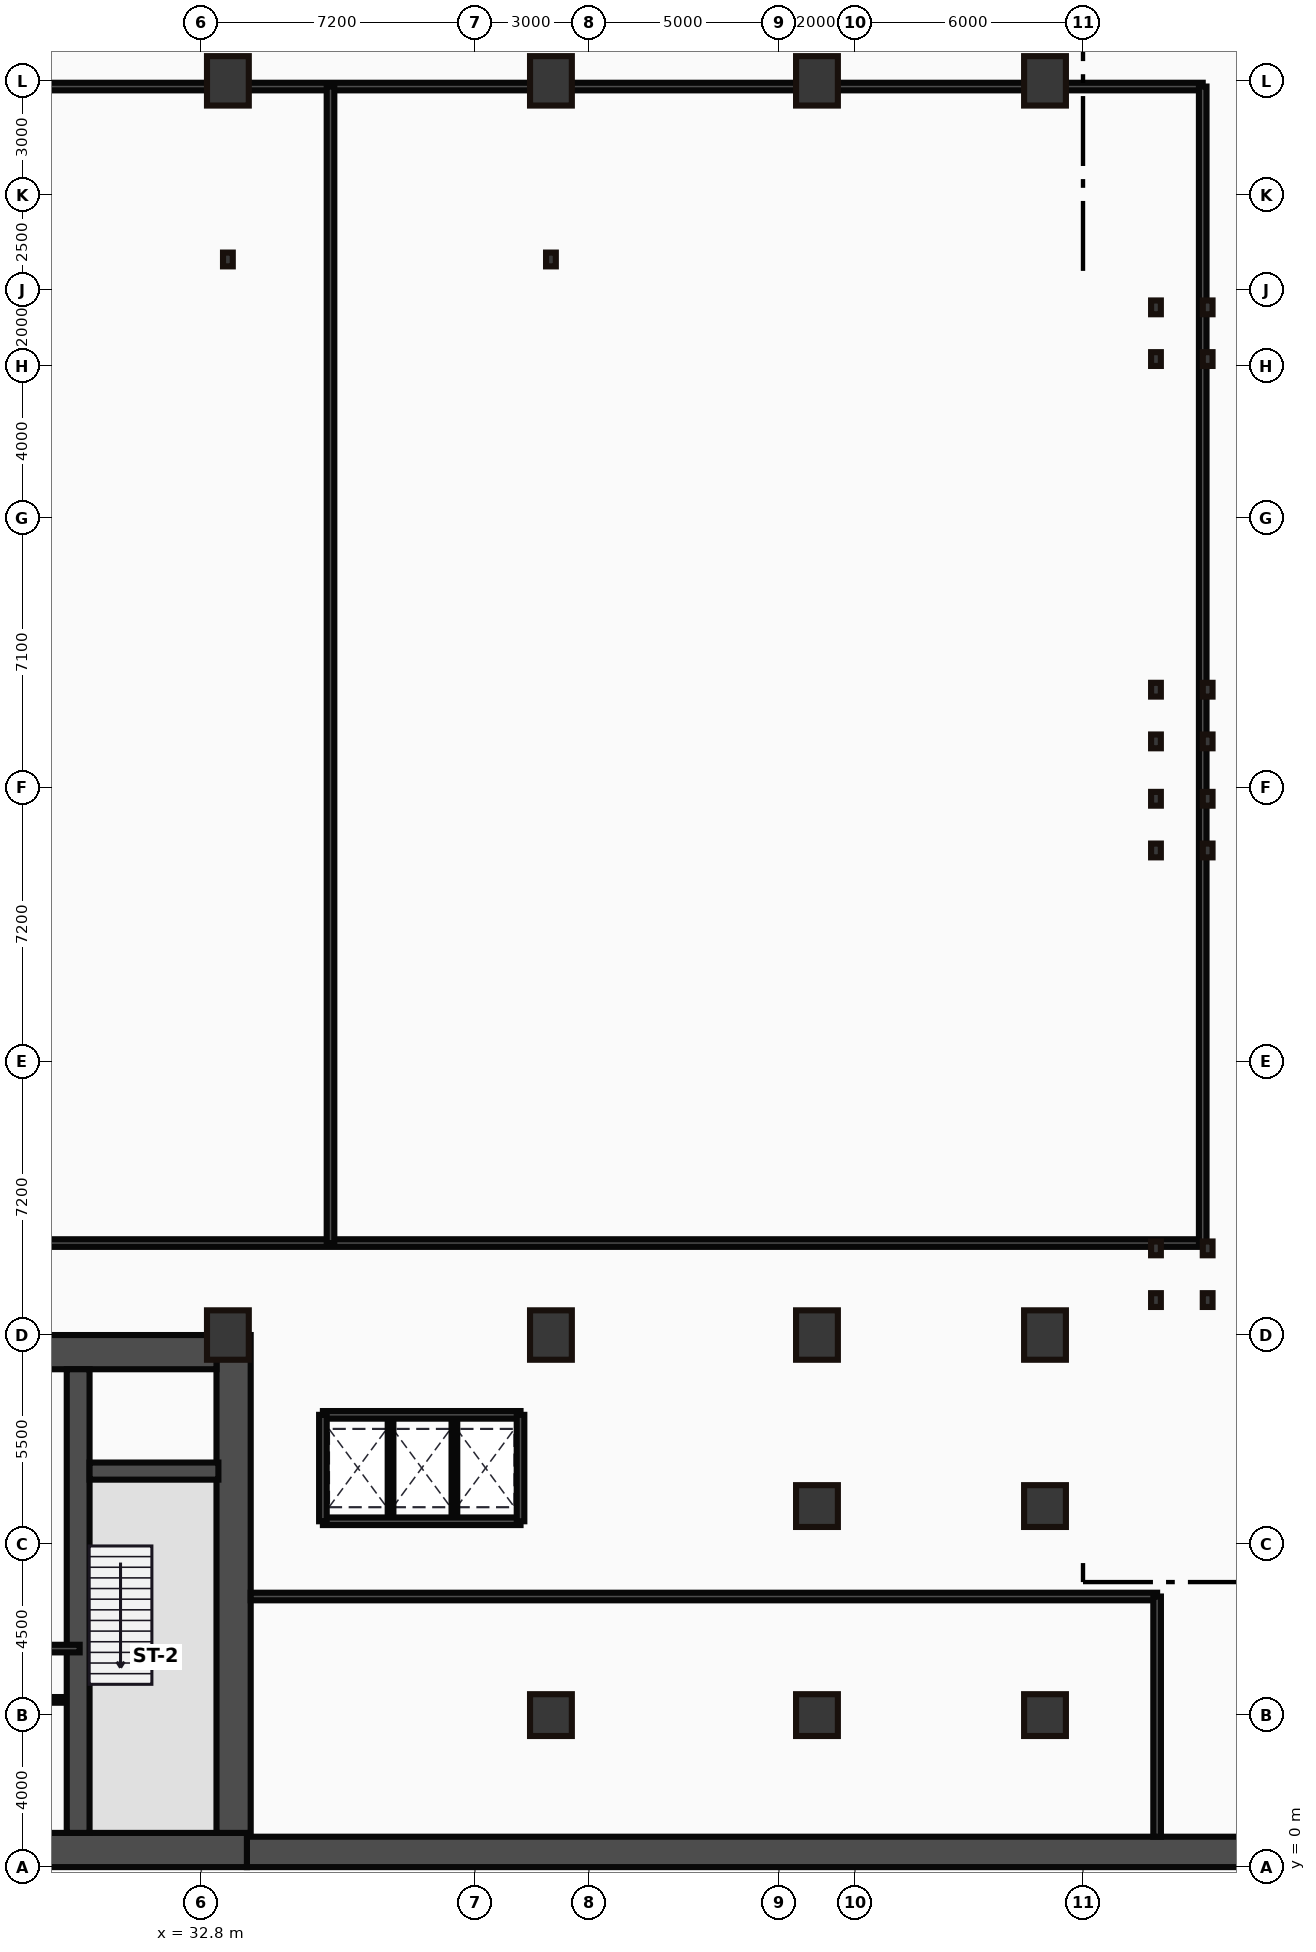
"""IFC4 building model, lengths in metres.
Left out: names, types, materials, properties, quantities, classifications, styles, units other than length and angle.
Written with IfcOpenShell. Run it as: python <this file> out.ifc"""

import sys

from ifc_helpers import new_model, si_unit, direction, frame, frame_2d, origin, origin_2d, place, context, subcontext, project, spatial, rectangle, hollow_rectangle, i_section, extrude, source, transform, mapped, element, fill, save


model = new_model("IFC4")
c1 = context("Model", 3, precision=1e-05, world=origin(), true_north=direction((0.0, 1.0)))
c2 = subcontext(c1, "Body", "Model", "MODEL_VIEW")
j1 = project(units=[si_unit("LENGTHUNIT", "METRE"), si_unit("PLANEANGLEUNIT", "RADIAN")], contexts=[c1])
p1 = place(None, origin())
s1 = spatial("IfcSite", under=j1, at=p1, CompositionType="ELEMENT")
p2 = place(p1, origin())
s2 = spatial("IfcBuilding", under=s1, at=p2, CompositionType="ELEMENT")
p3 = place(p2, frame((0.0, 0.0, -5.0)))
s3 = spatial("IfcBuildingStorey", under=s2, at=p3, CompositionType="ELEMENT", Elevation=-5.0)
m1 = source(origin(), c2, "Body", "SweptSolid", [
    extrude(rectangle(XDim=48.0, YDim=0.8, at=frame_2d((24.0, 0.0))), origin(), (0.0, 0.0, 1.0), 5.0),
])
p4 = place(p3, frame((34.0, 0.4, 0.0), z_axis=(0.0, 0.0, 1.0), x_axis=(1.0, 0.0, 0.0)))
e1 = element("IfcWall", 1, at=p4, inside=s3, PredefinedType="USERDEFINED", context=c2, shape_type="MappedRepresentation", body=[
    mapped(m1, transform((0.0, 0.0, 0.0))),
])
m2 = source(origin(), c2, "Body", "SweptSolid", [
    extrude(rectangle(XDim=29.5, YDim=0.9, at=frame_2d((14.75, 0.0))), origin(), (0.0, 0.0, 1.0), 5.0),
])
p5 = place(p3, frame((4.5, 0.45, 0.0), z_axis=(0.0, 0.0, 1.0), x_axis=(1.0, 0.0, 0.0)))
e2 = element("IfcWall", 2, at=p5, inside=s3, PredefinedType="SHEAR", context=c2, shape_type="MappedRepresentation", body=[
    mapped(m2, transform((0.0, 0.0, 0.0))),
])
m3 = source(origin(), c2, "Body", "SweptSolid", [
    extrude(rectangle(XDim=13.1, YDim=0.9, at=frame_2d((6.55, 0.0))), origin(), (0.0, 0.0, 1.0), 5.0),
])
p6 = place(p3, frame((33.65, 0.9, 0.0), z_axis=(0.0, 0.0, 1.0), x_axis=(0.0, 1.0, 0.0)))
e3 = element("IfcWall", 3, at=p6, inside=s3, PredefinedType="SHEAR", context=c2, shape_type="MappedRepresentation", body=[
    mapped(m3, transform((0.0, 0.0, 0.0))),
])
m4 = source(origin(), c2, "Body", "SweptSolid", [
    extrude(rectangle(XDim=12.6, YDim=0.9, at=frame_2d((6.3, 0.0))), origin(), (0.0, 0.0, 1.0), 5.0),
])
p7 = place(p3, frame((20.6, 13.55, 0.0), z_axis=(0.0, 0.0, 1.0), x_axis=(1.0, 0.0, 0.0)))
e4 = element("IfcWall", 4, at=p7, inside=s3, PredefinedType="SHEAR", context=c2, shape_type="MappedRepresentation", body=[
    mapped(m4, transform((0.0, 0.0, 0.0))),
])
p8 = place(p7, frame((9.25, 0.0, 0.0)))
e5 = element("IfcOpeningElement", 5, at=p8, cuts=e4, PredefinedType="OPENING", context=c2, shape_type="SweptSolid", body=[
    extrude(rectangle(XDim=1.1, YDim=2.15, at=frame_2d((0.55, 1.075))), frame((0.0, 0.46, 0.0), z_axis=(0.0, -1.0, 0.0), x_axis=(1.0, 0.0, 0.0)), (0.0, 0.0, 1.0), 0.92),
])
m5 = source(origin(), c2, "Body", "SweptSolid", [
    extrude(rectangle(XDim=12.2, YDim=0.6, at=frame_2d((6.1, 0.0))), origin(), (0.0, 0.0, 1.0), 5.0),
])
p9 = place(p3, frame((29.56, 0.9, 0.0), z_axis=(0.0, 0.0, 1.0), x_axis=(0.0, 1.0, 0.0)))
e6 = element("IfcWall", 6, at=p9, inside=s3, PredefinedType="SHEAR", context=c2, shape_type="MappedRepresentation", body=[
    mapped(m5, transform((0.0, 0.0, 0.0))),
])
m6 = source(origin(), c2, "Body", "SweptSolid", [
    extrude(rectangle(XDim=3.39, YDim=0.45, at=frame_2d((1.695, 0.0))), origin(), (0.0, 0.0, 1.0), 5.0),
])
p10 = place(p3, frame((29.86, 10.42, 0.0), z_axis=(0.0, 0.0, 1.0), x_axis=(1.0, 0.0, 0.0)))
e7 = element("IfcWall", 7, at=p10, inside=s3, PredefinedType="SHEAR", context=c2, shape_type="MappedRepresentation", body=[
    mapped(m6, transform((0.0, 0.0, 0.0))),
])
p11 = place(p10, frame((1.1, 0.0, 0.0)))
e8 = element("IfcOpeningElement", 8, at=p11, cuts=e7, PredefinedType="OPENING", context=c2, shape_type="SweptSolid", body=[
    extrude(rectangle(XDim=1.1, YDim=2.15, at=frame_2d((0.55, 1.075))), frame((0.0, 0.235, 0.0), z_axis=(0.0, -1.0, 0.0), x_axis=(1.0, 0.0, 0.0)), (0.0, 0.0, 1.0), 0.47),
])
m7 = source(origin(), c2, "Body", "SweptSolid", [
    extrude(hollow_rectangle(XDim=1.1, YDim=1.3, WallThickness=0.055, at=origin_2d()), origin(), (0.0, 0.0, 1.0), 5.0),
])
for number, where, z_axis, x_axis in (
    (9, (33.5, 14.0, 0.0), (0.0, 0.0, 1.0), (1.0, 0.0, 0.0)),
    (10, (42.0, 14.0, 0.0), (0.0, 0.0, 1.0), (1.0, 0.0, 0.0)),
    (11, (49.0, 14.0, 0.0), (0.0, 0.0, 1.0), (1.0, 0.0, 0.0)),
    (12, (55.0, 14.0, 0.0), (0.0, 0.0, 1.0), (1.0, 0.0, 0.0)),
    (13, (33.5, 47.0, 0.0), (0.0, 0.0, 1.0), (1.0, 0.0, 0.0)),
    (14, (42.0, 47.0, 0.0), (0.0, 0.0, 1.0), (1.0, 0.0, 0.0)),
    (15, (49.0, 47.0, 0.0), (0.0, 0.0, 1.0), (1.0, 0.0, 0.0)),
    (16, (55.0, 47.0, 0.0), (0.0, 0.0, 1.0), (1.0, 0.0, 0.0)),
):
    element("IfcColumn", number, at=place(p3, frame(where, z_axis=z_axis, x_axis=x_axis)), inside=s3, PredefinedType="PILASTER", context=c2, shape_type="MappedRepresentation", body=[
        mapped(m7, transform((0.0, 0.0, 0.0))),
    ])
m8 = source(origin(), c2, "Body", "SweptSolid", [
    extrude(hollow_rectangle(XDim=1.1, YDim=1.1, WallThickness=0.05, at=origin_2d()), origin(), (0.0, 0.0, 1.0), 5.0),
])
for number, where, z_axis, x_axis in (
    (17, (49.0, 9.5, 0.0), (0.0, 0.0, 1.0), (1.0, 0.0, 0.0)),
    (18, (55.0, 9.5, 0.0), (0.0, 0.0, 1.0), (1.0, 0.0, 0.0)),
    (19, (42.0, 4.0, 0.0), (0.0, 0.0, 1.0), (1.0, 0.0, 0.0)),
    (20, (49.0, 4.0, 0.0), (0.0, 0.0, 1.0), (1.0, 0.0, 0.0)),
    (21, (55.0, 4.0, 0.0), (0.0, 0.0, 1.0), (1.0, 0.0, 0.0)),
):
    element("IfcColumn", number, at=place(p3, frame(where, z_axis=z_axis, x_axis=x_axis)), inside=s3, PredefinedType="PILASTER", context=c2, shape_type="MappedRepresentation", body=[
        mapped(m8, transform((0.0, 0.0, 0.0))),
    ])
m9 = source(origin(), c2, "Body", "SweptSolid", [
    extrude(i_section(OverallWidth=0.257, OverallDepth=0.363, WebThickness=0.013, FlangeThickness=0.022, at=origin_2d()), origin(), (0.0, 0.0, 1.0), 5.0),
])
for number, where, z_axis, x_axis in (
    (22, (33.5, 42.3, 0.0), (0.0, 0.0, 1.0), (1.0, 0.0, 0.0)),
    (23, (42.0, 42.3, 0.0), (0.0, 0.0, 1.0), (1.0, 0.0, 0.0)),
):
    element("IfcColumn", number, at=place(p3, frame(where, z_axis=z_axis, x_axis=x_axis)), inside=s3, PredefinedType="COLUMN", context=c2, shape_type="MappedRepresentation", body=[
        mapped(m9, transform((0.0, 0.0, 0.0))),
    ])
m10 = source(origin(), c2, "Body", "SweptSolid", [
    extrude(i_section(OverallWidth=0.257, OverallDepth=0.363, WebThickness=0.013, FlangeThickness=0.022, at=origin_2d()), origin(), (0.0, 0.0, 1.0), 4.8),
])
for number, where, z_axis, x_axis in (
    (24, (57.92, 14.92, 0.0), (0.0, 0.0, 1.0), (1.0, 0.0, 0.0)),
    (25, (57.92, 16.28, 0.0), (0.0, 0.0, 1.0), (1.0, 0.0, 0.0)),
    (26, (59.28, 14.92, 0.0), (0.0, 0.0, 1.0), (1.0, 0.0, 0.0)),
    (27, (59.28, 16.28, 0.0), (0.0, 0.0, 1.0), (1.0, 0.0, 0.0)),
):
    element("IfcColumn", number, at=place(p3, frame(where, z_axis=z_axis, x_axis=x_axis)), inside=s3, PredefinedType="COLUMN", context=c2, shape_type="MappedRepresentation", body=[
        mapped(m10, transform((0.0, 0.0, 0.0))),
    ])
for number, where, z_axis, x_axis in (
    (28, (57.92, 26.75, 0.0), (0.0, 0.0, 1.0), (1.0, 0.0, 0.0)),
    (29, (57.92, 28.11, 0.0), (0.0, 0.0, 1.0), (1.0, 0.0, 0.0)),
    (30, (59.28, 26.75, 0.0), (0.0, 0.0, 1.0), (1.0, 0.0, 0.0)),
    (31, (59.28, 28.11, 0.0), (0.0, 0.0, 1.0), (1.0, 0.0, 0.0)),
    (32, (57.92, 29.62, 0.0), (0.0, 0.0, 1.0), (1.0, 0.0, 0.0)),
    (33, (57.92, 30.98, 0.0), (0.0, 0.0, 1.0), (1.0, 0.0, 0.0)),
    (34, (59.28, 29.62, 0.0), (0.0, 0.0, 1.0), (1.0, 0.0, 0.0)),
    (35, (59.28, 30.98, 0.0), (0.0, 0.0, 1.0), (1.0, 0.0, 0.0)),
    (36, (57.92, 39.68, 0.0), (0.0, 0.0, 1.0), (1.0, 0.0, 0.0)),
    (37, (57.92, 41.04, 0.0), (0.0, 0.0, 1.0), (1.0, 0.0, 0.0)),
    (38, (59.28, 39.68, 0.0), (0.0, 0.0, 1.0), (1.0, 0.0, 0.0)),
    (39, (59.28, 41.04, 0.0), (0.0, 0.0, 1.0), (1.0, 0.0, 0.0)),
):
    element("IfcColumn", number, at=place(p3, frame(where, z_axis=z_axis, x_axis=x_axis)), inside=s3, PredefinedType="COLUMN", context=c2, shape_type="MappedRepresentation", body=[
        mapped(m9, transform((0.0, 0.0, 0.0))),
    ])
m11 = source(origin(), c2, "Body", "SweptSolid", [
    extrude(rectangle(XDim=4.6, YDim=0.2, at=frame_2d((2.3, 0.0))), origin(), (0.0, 0.0, 1.0), 4.7),
])
p12 = place(p3, frame((25.0, 5.75, 0.0), z_axis=(0.0, 0.0, 1.0), x_axis=(1.0, 0.0, 0.0)))
e40 = element("IfcWall", 40, at=p12, inside=s3, PredefinedType="PARTITIONING", context=c2, shape_type="MappedRepresentation", body=[
    mapped(m11, transform((0.0, 0.0, 0.0))),
])
m12 = source(origin(), c2, "Body", "SweptSolid", [
    extrude(rectangle(XDim=4.55, YDim=0.15, at=frame_2d((2.275, 0.0))), origin(), (0.0, 0.0, 1.0), 4.7),
])
p13 = place(p3, frame((25.0, 4.4, 0.0), z_axis=(0.0, 0.0, 1.0), x_axis=(1.0, 0.0, 0.0)))
e41 = element("IfcWall", 41, at=p13, inside=s3, PredefinedType="PARTITIONING", context=c2, shape_type="MappedRepresentation", body=[
    mapped(m12, transform((0.0, 0.0, 0.0))),
])
m13 = source(origin(), c2, "Body", "SweptSolid", [
    extrude(rectangle(XDim=5.2, YDim=0.2, at=frame_2d((2.6, 0.0))), origin(), (0.0, 0.0, 1.0), 4.7),
])
p14 = place(p3, frame((36.0, 9.1, 0.0), z_axis=(0.0, 0.0, 1.0), x_axis=(1.0, 0.0, 0.0)))
e42 = element("IfcWall", 42, at=p14, inside=s3, PredefinedType="PARTITIONING", context=c2, shape_type="MappedRepresentation", body=[
    mapped(m13, transform((0.0, 0.0, 0.0))),
])
p15 = place(p14, frame((0.32, 0.0, 0.0)))
e43 = element("IfcOpeningElement", 43, at=p15, cuts=e42, PredefinedType="OPENING", context=c2, shape_type="SweptSolid", body=[
    extrude(rectangle(XDim=1.05, YDim=2.15, at=frame_2d((0.525, 1.075))), frame((0.0, 0.11, 0.0), z_axis=(0.0, -1.0, 0.0), x_axis=(1.0, 0.0, 0.0)), (0.0, 0.0, 1.0), 0.22),
])
p16 = place(p14, frame((2.0, 0.0, 0.0)))
e44 = element("IfcOpeningElement", 44, at=p16, cuts=e42, PredefinedType="OPENING", context=c2, shape_type="SweptSolid", body=[
    extrude(rectangle(XDim=1.05, YDim=2.15, at=frame_2d((0.525, 1.075))), frame((0.0, 0.11, 0.0), z_axis=(0.0, -1.0, 0.0), x_axis=(1.0, 0.0, 0.0)), (0.0, 0.0, 1.0), 0.22),
])
p17 = place(p14, frame((3.68, 0.0, 0.0)))
e45 = element("IfcOpeningElement", 45, at=p17, cuts=e42, PredefinedType="OPENING", context=c2, shape_type="SweptSolid", body=[
    extrude(rectangle(XDim=1.05, YDim=2.15, at=frame_2d((0.525, 1.075))), frame((0.0, 0.11, 0.0), z_axis=(0.0, -1.0, 0.0), x_axis=(1.0, 0.0, 0.0)), (0.0, 0.0, 1.0), 0.22),
])
p18 = place(p3, frame((36.0, 11.9, 0.0), z_axis=(0.0, 0.0, 1.0), x_axis=(1.0, 0.0, 0.0)))
e46 = element("IfcWall", 46, at=p18, inside=s3, PredefinedType="PARTITIONING", context=c2, shape_type="MappedRepresentation", body=[
    mapped(m13, transform((0.0, 0.0, 0.0))),
])
m14 = source(origin(), c2, "Body", "SweptSolid", [
    extrude(rectangle(XDim=2.8, YDim=0.2, at=frame_2d((1.4, 0.0))), origin(), (0.0, 0.0, 1.0), 4.7),
])
for number, where, z_axis, x_axis in (
    (47, (36.0, 9.1, 0.0), (0.0, 0.0, 1.0), (0.0, 1.0, 0.0)),
    (48, (41.2, 9.1, 0.0), (0.0, 0.0, 1.0), (0.0, 1.0, 0.0)),
):
    element("IfcWall", number, at=place(p3, frame(where, z_axis=z_axis, x_axis=x_axis)), inside=s3, PredefinedType="PARTITIONING", context=c2, shape_type="MappedRepresentation", body=[
        mapped(m14, transform((0.0, 0.0, 0.0))),
    ])
m15 = source(origin(), c2, "Body", "SweptSolid", [
    extrude(rectangle(XDim=2.7, YDim=0.15, at=frame_2d((1.35, 0.0))), origin(), (0.0, 0.0, 1.0), 4.7),
])
for number, where, z_axis, x_axis in (
    (49, (37.78, 9.15, 0.0), (0.0, 0.0, 1.0), (0.0, 1.0, 0.0)),
    (50, (39.46, 9.15, 0.0), (0.0, 0.0, 1.0), (0.0, 1.0, 0.0)),
):
    element("IfcWall", number, at=place(p3, frame(where, z_axis=z_axis, x_axis=x_axis)), inside=s3, PredefinedType="PARTITIONING", context=c2, shape_type="MappedRepresentation", body=[
        mapped(m15, transform((0.0, 0.0, 0.0))),
    ])
m16 = source(origin(), c2, "Body", "SweptSolid", [
    extrude(rectangle(XDim=47.0, YDim=0.2, at=frame_2d((23.5, 0.0))), origin(), (0.0, 0.0, 1.0), 4.7),
])
p19 = place(p3, frame((12.15, 16.42, 0.0), z_axis=(0.0, 0.0, 1.0), x_axis=(1.0, 0.0, 0.0)))
e51 = element("IfcWall", 51, at=p19, inside=s3, PredefinedType="PARTITIONING", context=c2, shape_type="MappedRepresentation", body=[
    mapped(m16, transform((0.0, 0.0, 0.0))),
])
p20 = place(p19, frame((6.8, 0.0, 0.0)))
e52 = element("IfcOpeningElement", 52, at=p20, cuts=e51, PredefinedType="OPENING", context=c2, shape_type="SweptSolid", body=[
    extrude(rectangle(XDim=1.1, YDim=2.15, at=frame_2d((0.55, 1.075))), frame((0.0, 0.11, 0.0), z_axis=(0.0, -1.0, 0.0), x_axis=(1.0, 0.0, 0.0)), (0.0, 0.0, 1.0), 0.22),
])
p21 = place(p19, frame((34.2, 0.0, 0.0)))
e53 = element("IfcOpeningElement", 53, at=p21, cuts=e51, PredefinedType="OPENING", context=c2, shape_type="SweptSolid", body=[
    extrude(rectangle(XDim=1.1, YDim=2.15, at=frame_2d((0.55, 1.075))), frame((0.0, 0.11, 0.0), z_axis=(0.0, -1.0, 0.0), x_axis=(1.0, 0.0, 0.0)), (0.0, 0.0, 1.0), 0.22),
])
m17 = source(origin(), c2, "Body", "SweptSolid", [
    extrude(rectangle(XDim=47.0, YDim=0.2, at=frame_2d((23.5, 0.0))), origin(), (0.0, 0.0, 1.0), 3.844),
])
p22 = place(p3, frame((12.15, 46.85, 0.0), z_axis=(0.0, 0.0, 1.0), x_axis=(1.0, 0.0, 0.0)))
e54 = element("IfcWall", 54, at=p22, inside=s3, PredefinedType="PARTITIONING", context=c2, shape_type="MappedRepresentation", body=[
    mapped(m17, transform((0.0, 0.0, 0.0))),
])
m18 = source(origin(), c2, "Body", "SweptSolid", [
    extrude(rectangle(XDim=30.43, YDim=0.2, at=frame_2d((15.215, 0.0))), origin(), (0.0, 0.0, 1.0), 4.7),
])
for number, where, z_axis, x_axis in (
    (55, (59.15, 16.42, 0.0), (0.0, 0.0, 1.0), (0.0, 1.0, 0.0)),
    (56, (36.2, 16.42, 0.0), (0.0, 0.0, 1.0), (0.0, 1.0, 0.0)),
):
    element("IfcWall", number, at=place(p3, frame(where, z_axis=z_axis, x_axis=x_axis)), inside=s3, PredefinedType="PARTITIONING", context=c2, shape_type="MappedRepresentation", body=[
        mapped(m18, transform((0.0, 0.0, 0.0))),
    ])
m19 = source(origin(), c2, "Body", "SweptSolid", [
    extrude(rectangle(XDim=23.85, YDim=0.2, at=frame_2d((11.925, 0.0))), origin(), (0.0, 0.0, 1.0), 4.7),
])
p23 = place(p3, frame((34.1, 7.12, 0.0), z_axis=(0.0, 0.0, 1.0), x_axis=(1.0, 0.0, 0.0)))
e57 = element("IfcWall", 57, at=p23, inside=s3, PredefinedType="PARTITIONING", context=c2, shape_type="MappedRepresentation", body=[
    mapped(m19, transform((0.0, 0.0, 0.0))),
])
p24 = place(p23, frame((10.5, 0.0, 0.0)))
e58 = element("IfcOpeningElement", 58, at=p24, cuts=e57, PredefinedType="OPENING", context=c2, shape_type="SweptSolid", body=[
    extrude(rectangle(XDim=1.1, YDim=2.15, at=frame_2d((0.55, 1.075))), frame((0.0, 0.11, 0.0), z_axis=(0.0, -1.0, 0.0), x_axis=(1.0, 0.0, 0.0)), (0.0, 0.0, 1.0), 0.22),
])
m20 = source(origin(), c2, "Body", "SweptSolid", [
    extrude(rectangle(XDim=6.32, YDim=0.2, at=frame_2d((3.16, 0.0))), origin(), (0.0, 0.0, 1.0), 4.7),
])
p25 = place(p3, frame((57.95, 0.8, 0.0), z_axis=(0.0, 0.0, 1.0), x_axis=(0.0, 1.0, 0.0)))
e59 = element("IfcWall", 59, at=p25, inside=s3, PredefinedType="PARTITIONING", context=c2, shape_type="MappedRepresentation", body=[
    mapped(m20, transform((0.0, 0.0, 0.0))),
])
m21 = source(origin(), c2, "Body", "SweptSolid", [
    extrude(rectangle(XDim=1.1, YDim=2.15, at=frame_2d((0.55, 1.075))), frame((0.0, 0.025, 0.0), z_axis=(0.0, -1.0, 0.0), x_axis=(1.0, 0.0, 0.0)), (0.0, 0.0, 1.0), 0.05),
])
p26 = place(p11, frame((1.1, 0.0, 0.0), z_axis=(0.0, 0.0, 1.0), x_axis=(-1.0, 0.0, 0.0)))
e60 = element("IfcDoor", 60, at=p26, inside=s3, OperationType="SINGLE_SWING_RIGHT", PredefinedType="DOOR", context=c2, shape_type="MappedRepresentation", body=[
    mapped(m21, transform((0.0, 0.0, 0.0))),
])
fill(e8, e60)
p27 = place(p8, origin())
e61 = element("IfcDoor", 61, at=p27, inside=s3, OperationType="SINGLE_SWING_LEFT", PredefinedType="DOOR", context=c2, shape_type="MappedRepresentation", body=[
    mapped(m21, transform((0.0, 0.0, 0.0))),
])
fill(e5, e61)
m22 = source(origin(), c2, "Body", "SweptSolid", [
    extrude(rectangle(XDim=1.05, YDim=2.15, at=frame_2d((0.525, 1.075))), frame((0.0, 0.025, 0.0), z_axis=(0.0, -1.0, 0.0), x_axis=(1.0, 0.0, 0.0)), (0.0, 0.0, 1.0), 0.05),
])
p28 = place(p15, frame((1.05, 0.0, 0.0), z_axis=(0.0, 0.0, 1.0), x_axis=(-1.0, 0.0, 0.0)))
e62 = element("IfcDoor", 62, at=p28, inside=s3, OperationType="SLIDING_TO_LEFT", PredefinedType="DOOR", context=c2, shape_type="MappedRepresentation", body=[
    mapped(m22, transform((0.0, 0.0, 0.0))),
])
fill(e43, e62)
p29 = place(p16, frame((1.05, 0.0, 0.0), z_axis=(0.0, 0.0, 1.0), x_axis=(-1.0, 0.0, 0.0)))
e63 = element("IfcDoor", 63, at=p29, inside=s3, OperationType="SLIDING_TO_LEFT", PredefinedType="DOOR", context=c2, shape_type="MappedRepresentation", body=[
    mapped(m22, transform((0.0, 0.0, 0.0))),
])
fill(e44, e63)
p30 = place(p17, frame((1.05, 0.0, 0.0), z_axis=(0.0, 0.0, 1.0), x_axis=(-1.0, 0.0, 0.0)))
e64 = element("IfcDoor", 64, at=p30, inside=s3, OperationType="SLIDING_TO_LEFT", PredefinedType="DOOR", context=c2, shape_type="MappedRepresentation", body=[
    mapped(m22, transform((0.0, 0.0, 0.0))),
])
fill(e45, e64)
p31 = place(p21, origin())
e65 = element("IfcDoor", 65, at=p31, inside=s3, OperationType="SINGLE_SWING_RIGHT", PredefinedType="DOOR", context=c2, shape_type="MappedRepresentation", body=[
    mapped(m21, transform((0.0, 0.0, 0.0))),
])
fill(e53, e65)
p32 = place(p24, frame((1.1, 0.0, 0.0), z_axis=(0.0, 0.0, 1.0), x_axis=(-1.0, 0.0, 0.0)))
e66 = element("IfcDoor", 66, at=p32, inside=s3, OperationType="SINGLE_SWING_LEFT", PredefinedType="DOOR", context=c2, shape_type="MappedRepresentation", body=[
    mapped(m21, transform((0.0, 0.0, 0.0))),
])
fill(e58, e66)
save(model, sys.argv[1])
